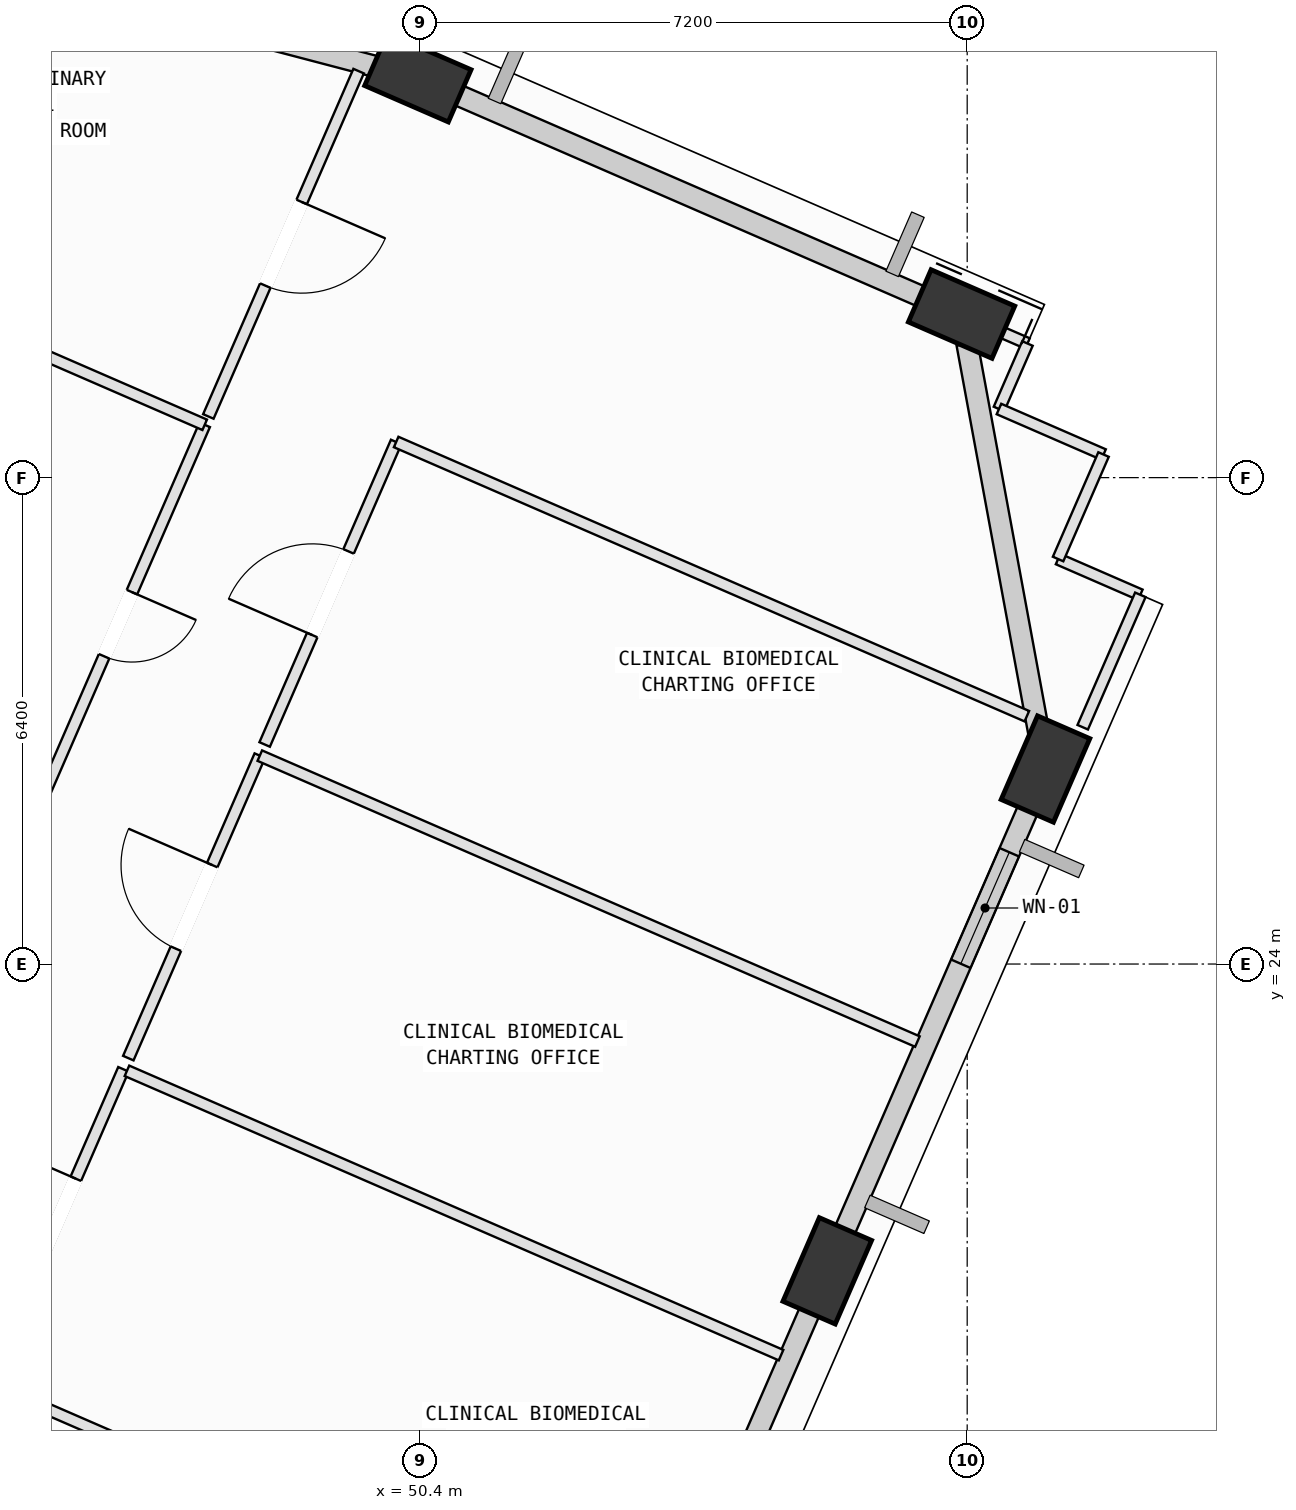
"""IFC4 building model, lengths in metres.
Left out: names, types, materials, properties, quantities, classifications, styles, units other than length and angle.
Written with IfcOpenShell. Run it as: python <this file> out.ifc"""

import sys

from ifc_helpers import new_model, si_unit, direction, frame, frame_2d, origin, origin_2d, place, context, subcontext, project, spatial, rectangle, extrude, element, fill, save


model = new_model("IFC4")
c1 = context("Model", 3, precision=1e-05, world=origin(), true_north=direction((0.0, 1.0)))
c2 = subcontext(c1, "Body", "Model", "MODEL_VIEW")
j1 = project(units=[si_unit("LENGTHUNIT", "METRE"), si_unit("PLANEANGLEUNIT", "RADIAN")], contexts=[c1])
p1 = place(None, origin())
s1 = spatial("IfcSite", under=j1, at=p1, CompositionType="ELEMENT")
p2 = place(p1, origin())
s2 = spatial("IfcBuilding", under=s1, at=p2, CompositionType="ELEMENT")
p3 = place(p2, frame((0.0, 0.0, 320.6)))
s3 = spatial("IfcBuildingStorey", under=s2, at=p3, CompositionType="ELEMENT", Elevation=320.6)
for number, where, z_axis, x_axis in (
    (1, (55.759, 19.963, 0.002), (0.0, 0.0, 1.0), (0.399, 0.917, 0.0)),
    (2, (58.63, 26.566, 0.002), (0.0, 0.0, 1.0), (0.399, 0.917, 0.0)),
    (3, (57.526, 32.553, 0.002), (0.0, 0.0, 1.0), (-0.917, 0.399, 0.0)),
    (4, (50.373, 35.663, 0.002), (0.0, 0.0, 1.0), (-0.917, 0.399, 0.0)),
):
    element("IfcColumn", number, at=place(p3, frame(where, z_axis=z_axis, x_axis=x_axis)), inside=s3, PredefinedType="COLUMN", context=c2, shape_type="SweptSolid", body=[
        extrude(rectangle(XDim=1.2, YDim=0.75, at=origin_2d()), origin(), (0.0, 0.0, 1.0), 3.996),
    ])
p4 = place(p3, frame((55.601, 19.598, 0.0), z_axis=(0.0, 0.0, 1.0), x_axis=(-0.398744230651, -0.917062178112, 0.0)))
e5 = element("IfcWall", 5, at=p4, inside=s3, PredefinedType="SOLIDWALL", context=c2, shape_type="SweptSolid", body=[
    extrude(rectangle(XDim=6.405, YDim=0.28, at=frame_2d((3.203, 0.0))), origin(), (0.0, 0.0, 1.0), 3.245),
])
p5 = place(p4, frame((2.432, 0.0, 0.75)))
e6 = element("IfcOpeningElement", 6, at=p5, cuts=e5, PredefinedType="OPENING", context=c2, shape_type="SweptSolid", body=[
    extrude(rectangle(XDim=1.2, YDim=1.75, at=frame_2d((0.6, 0.875))), frame((0.0, 0.15, 0.0), z_axis=(0.0, -1.0, 0.0), x_axis=(1.0, 0.0, 0.0)), (0.0, 0.0, 1.0), 0.3),
])
p6 = place(p3, frame((58.472, 26.201, 0.0), z_axis=(0.0, 0.0, 1.0), x_axis=(-0.398776286617, -0.917048239316, 0.0)))
e7 = element("IfcWall", 7, at=p6, inside=s3, PredefinedType="SOLIDWALL", context=c2, shape_type="SweptSolid", body=[
    extrude(rectangle(XDim=6.405, YDim=0.28, at=frame_2d((3.203, 0.0))), origin(), (0.0, 0.0, 1.0), 3.245),
])
p7 = place(p6, frame((0.796, 0.0, 0.75)))
e8 = element("IfcOpeningElement", 8, at=p7, cuts=e7, PredefinedType="OPENING", context=c2, shape_type="SweptSolid", body=[
    extrude(rectangle(XDim=1.6, YDim=1.95, at=frame_2d((0.8, 0.975))), frame((0.0, 0.15, 0.0), z_axis=(0.0, -1.0, 0.0), x_axis=(1.0, 0.0, 0.0)), (0.0, 0.0, 1.0), 0.3),
])
p8 = place(p3, frame((57.598, 32.162, 0.0), z_axis=(0.0, 0.0, 1.0), x_axis=(0.181421889976, -0.983405357845, 0.0)))
e9 = element("IfcWall", 9, at=p8, inside=s3, PredefinedType="SOLIDWALL", context=c2, shape_type="SweptSolid", body=[
    extrude(rectangle(XDim=5.293, YDim=0.28, at=frame_2d((2.646, 0.0))), origin(), (0.0, 0.0, 1.0), 3.265),
])
p9 = place(p3, frame((50.737, 35.504, 0.0), z_axis=(0.0, 0.0, 1.0), x_axis=(0.917057311373, -0.398755423359, 0.0)))
e10 = element("IfcWall", 10, at=p9, inside=s3, PredefinedType="SOLIDWALL", context=c2, shape_type="SweptSolid", body=[
    extrude(rectangle(XDim=7.005, YDim=0.28, at=frame_2d((3.502, 0.0))), origin(), (0.0, 0.0, 1.0), 3.265),
])
p10 = place(p3, frame((41.264, 38.054, 0.0), z_axis=(0.0, 0.0, 1.0), x_axis=(0.967228971308, -0.253905724755, 0.0)))
e11 = element("IfcWall", 11, at=p10, inside=s3, PredefinedType="SOLIDWALL", context=c2, shape_type="SweptSolid", body=[
    extrude(rectangle(XDim=9.02, YDim=0.28, at=frame_2d((4.51, 0.0))), origin(), (0.0, 0.0, 1.0), 3.265),
])
p11 = place(p3, frame((44.704, 18.489, 0.0), z_axis=(0.0, 0.0, 1.0), x_axis=(0.917037556052, -0.398800853547, 0.0)))
e12 = element("IfcWall", 12, at=p11, inside=s3, PredefinedType="PARTITIONING", context=c2, shape_type="SweptSolid", body=[
    extrude(rectangle(XDim=9.436, YDim=0.15, at=frame_2d((4.718, 0.0))), origin(), (0.0, 0.0, 1.0), 3.78),
])
p12 = place(p3, frame((44.768, 18.635, 0.0), z_axis=(0.0, 0.0, 1.0), x_axis=(0.398828954963, 0.91702533481, 0.0)))
e13 = element("IfcWall", 13, at=p12, inside=s3, PredefinedType="PARTITIONING", context=c2, shape_type="SweptSolid", body=[
    extrude(rectangle(XDim=4.34, YDim=0.15, at=frame_2d((2.17, 0.0))), origin(), (0.0, 0.0, 1.0), 3.415),
])
p13 = place(p12, frame((1.57, 0.0, 0.0)))
e14 = element("IfcOpeningElement", 14, at=p13, cuts=e13, PredefinedType="OPENING", context=c2, shape_type="SweptSolid", body=[
    extrude(rectangle(XDim=1.2, YDim=2.15, at=frame_2d((0.6, 1.075))), frame((0.0, 0.085, 0.0), z_axis=(0.0, -1.0, 0.0), x_axis=(1.0, 0.0, 0.0)), (0.0, 0.0, 1.0), 0.17),
])
p14 = place(p3, frame((46.545, 22.595, 0.0), z_axis=(0.0, 0.0, 1.0), x_axis=(0.917099421132, -0.39865856539, 0.0)))
e15 = element("IfcWall", 15, at=p14, inside=s3, PredefinedType="PARTITIONING", context=c2, shape_type="SweptSolid", body=[
    extrude(rectangle(XDim=9.384, YDim=0.15, at=frame_2d((4.692, 0.0))), origin(), (0.0, 0.0, 1.0), 3.78),
])
p15 = place(p3, frame((46.563, 22.762, 0.0), z_axis=(0.0, 0.0, 1.0), x_axis=(0.398639711207, 0.917107616722, 0.0)))
e16 = element("IfcWall", 16, at=p15, inside=s3, PredefinedType="PARTITIONING", context=c2, shape_type="SweptSolid", body=[
    extrude(rectangle(XDim=4.34, YDim=0.15, at=frame_2d((2.17, 0.0))), origin(), (0.0, 0.0, 1.0), 3.415),
])
p16 = place(p15, frame((1.57, 0.0, 0.0)))
e17 = element("IfcOpeningElement", 17, at=p16, cuts=e16, PredefinedType="OPENING", context=c2, shape_type="SweptSolid", body=[
    extrude(rectangle(XDim=1.2, YDim=2.15, at=frame_2d((0.6, 1.075))), frame((0.0, 0.085, 0.0), z_axis=(0.0, -1.0, 0.0), x_axis=(1.0, 0.0, 0.0)), (0.0, 0.0, 1.0), 0.17),
])
p17 = place(p3, frame((48.293, 26.742, 0.0), z_axis=(0.0, 0.0, 1.0), x_axis=(0.917063062267, -0.398742197197, 0.0)))
e18 = element("IfcWall", 18, at=p17, inside=s3, PredefinedType="PARTITIONING", context=c2, shape_type="SweptSolid", body=[
    extrude(rectangle(XDim=9.435, YDim=0.15, at=frame_2d((4.717, 0.0))), origin(), (0.0, 0.0, 1.0), 3.78),
])
p18 = place(p3, frame((56.128, 20.236, 0.0), z_axis=(0.0, 0.0, 1.0), x_axis=(-0.398658726612, -0.91709935105, 0.0)))
e19 = element("IfcWall", 19, at=p18, inside=s3, PredefinedType="PARTITIONING", context=c2, shape_type="SweptSolid", body=[
    extrude(rectangle(XDim=0.795, YDim=0.15, at=frame_2d((0.397, 0.0))), origin(), (0.0, 0.0, 1.0), 3.245),
])
p19 = place(p3, frame((48.357, 26.889, 0.0), z_axis=(0.0, 0.0, 1.0), x_axis=(0.398639711207, 0.917107616722, 0.0)))
e20 = element("IfcWall", 20, at=p19, inside=s3, PredefinedType="PARTITIONING", context=c2, shape_type="SweptSolid", body=[
    extrude(rectangle(XDim=4.34, YDim=0.15, at=frame_2d((2.17, 0.0))), origin(), (0.0, 0.0, 1.0), 3.78),
])
p20 = place(p19, frame((1.57, 0.0, 0.0)))
e21 = element("IfcOpeningElement", 21, at=p20, cuts=e20, PredefinedType="OPENING", context=c2, shape_type="SweptSolid", body=[
    extrude(rectangle(XDim=1.2, YDim=2.15, at=frame_2d((0.6, 1.075))), frame((0.0, 0.085, 0.0), z_axis=(0.0, -1.0, 0.0), x_axis=(1.0, 0.0, 0.0)), (0.0, 0.0, 1.0), 0.17),
])
p21 = place(p3, frame((50.087, 30.869, 0.0), z_axis=(0.0, 0.0, 1.0), x_axis=(0.917068340421, -0.398730057805, 0.0)))
e22 = element("IfcWall", 22, at=p21, inside=s3, PredefinedType="PARTITIONING", context=c2, shape_type="SweptSolid", body=[
    extrude(rectangle(XDim=9.049, YDim=0.15, at=frame_2d((4.524, 0.0))), origin(), (0.0, 0.0, 1.0), 3.78),
])
p22 = place(p3, frame((59.056, 26.969, 0.0), z_axis=(0.0, 0.0, 1.0), x_axis=(-0.399259700559, -0.91683787635, 0.0)))
e23 = element("IfcWall", 23, at=p22, inside=s3, PredefinedType="PARTITIONING", context=c2, shape_type="SweptSolid", body=[
    extrude(rectangle(XDim=0.937, YDim=0.15, at=frame_2d((0.468, 0.0))), origin(), (0.0, 0.0, 1.0), 3.265),
])
p23 = place(p3, frame((58.796, 29.329, 0.0), z_axis=(0.0, 0.0, 1.0), x_axis=(0.916839684451, -0.399255548509, 0.0)))
e24 = element("IfcWall", 24, at=p23, inside=s3, PredefinedType="PARTITIONING", context=c2, shape_type="SweptSolid", body=[
    extrude(rectangle(XDim=1.18, YDim=0.15, at=frame_2d((0.59, 0.0))), origin(), (0.0, 0.0, 1.0), 3.78),
])
p24 = place(p3, frame((59.878, 28.858, 0.0), z_axis=(0.0, 0.0, 1.0), x_axis=(-0.39892347819, -0.916984219357, 0.0)))
e25 = element("IfcWall", 25, at=p24, inside=s3, PredefinedType="PARTITIONING", context=c2, shape_type="SweptSolid", body=[
    extrude(rectangle(XDim=1.9, YDim=0.15, at=frame_2d((0.95, 0.0))), origin(), (0.0, 0.0, 1.0), 3.78),
])
p25 = place(p3, frame((57.157, 32.702, 0.0), z_axis=(0.0, 0.0, 1.0), x_axis=(0.917222637379, -0.398374991032, 0.0)))
e26 = element("IfcWall", 26, at=p25, inside=s3, PredefinedType="PARTITIONING", context=c2, shape_type="SweptSolid", body=[
    extrude(rectangle(XDim=1.348, YDim=0.15, at=frame_2d((0.674, 0.0))), origin(), (0.0, 0.0, 1.0), 3.265),
])
p26 = place(p3, frame((58.393, 32.165, 0.0), z_axis=(0.0, 0.0, 1.0), x_axis=(-0.39889703488, -0.916995722762, 0.0)))
e27 = element("IfcWall", 27, at=p26, inside=s3, PredefinedType="PARTITIONING", context=c2, shape_type="SweptSolid", body=[
    extrude(rectangle(XDim=0.94, YDim=0.15, at=frame_2d((0.47, 0.0))), origin(), (0.0, 0.0, 1.0), 3.78),
])
p27 = place(p3, frame((58.018, 31.303, 0.0), z_axis=(0.0, 0.0, 1.0), x_axis=(0.91691738696, -0.399077067107, 0.0)))
e28 = element("IfcWall", 28, at=p27, inside=s3, PredefinedType="PARTITIONING", context=c2, shape_type="SweptSolid", body=[
    extrude(rectangle(XDim=1.501, YDim=0.15, at=frame_2d((0.75, 0.0))), origin(), (0.0, 0.0, 1.0), 3.78),
])
p28 = place(p3, frame((59.394, 30.704, 0.0), z_axis=(0.0, 0.0, 1.0), x_axis=(-0.398904712107, -0.916992383097, 0.0)))
e29 = element("IfcWall", 29, at=p28, inside=s3, PredefinedType="PARTITIONING", context=c2, shape_type="SweptSolid", body=[
    extrude(rectangle(XDim=1.5, YDim=0.15, at=frame_2d((0.75, 0.0))), origin(), (0.0, 0.0, 1.0), 3.78),
])
p29 = place(p3, frame((47.568, 31.095, 0.0), z_axis=(0.0, 0.0, 1.0), x_axis=(-0.398677741034, -0.917091085337, 0.0)))
e30 = element("IfcWall", 30, at=p29, inside=s3, PredefinedType="PARTITIONING", context=c2, shape_type="SweptSolid", body=[
    extrude(rectangle(XDim=5.721, YDim=0.15, at=frame_2d((2.861, 0.0))), origin(), (0.0, 0.0, 1.0), 3.78),
])
p30 = place(p29, frame((2.401, 0.0, 0.0)))
e31 = element("IfcOpeningElement", 31, at=p30, cuts=e30, PredefinedType="OPENING", context=c2, shape_type="SweptSolid", body=[
    extrude(rectangle(XDim=0.92, YDim=2.1, at=frame_2d((0.46, 1.05))), frame((0.0, 0.085, 0.0), z_axis=(0.0, -1.0, 0.0), x_axis=(1.0, 0.0, 0.0)), (0.0, 0.0, 1.0), 0.17),
])
p31 = place(p3, frame((39.466, 34.618, 0.0), z_axis=(0.0, 0.0, 1.0), x_axis=(0.917056875857, -0.398756424957, 0.0)))
e32 = element("IfcWall", 32, at=p31, inside=s3, PredefinedType="PARTITIONING", context=c2, shape_type="SweptSolid", body=[
    extrude(rectangle(XDim=8.835, YDim=0.15, at=frame_2d((4.417, 0.0))), origin(), (0.0, 0.0, 1.0), 3.78),
])
p32 = place(p3, frame((49.593, 35.749, 0.0), z_axis=(0.0, 0.0, 1.0), x_axis=(-0.398967500085, -0.916965066879, 0.0)))
e33 = element("IfcWall", 33, at=p32, inside=s3, PredefinedType="PARTITIONING", context=c2, shape_type="SweptSolid", body=[
    extrude(rectangle(XDim=4.955, YDim=0.15, at=frame_2d((2.478, 0.0))), origin(), (0.0, 0.0, 1.0), 2.765),
])
p33 = place(p32, frame((1.878, 0.0, 0.0)))
e34 = element("IfcOpeningElement", 34, at=p33, cuts=e33, PredefinedType="OPENING", context=c2, shape_type="SweptSolid", body=[
    extrude(rectangle(XDim=1.2, YDim=2.15, at=frame_2d((0.6, 1.075))), frame((0.0, 0.085, 0.0), z_axis=(0.0, -1.0, 0.0), x_axis=(1.0, 0.0, 0.0)), (0.0, 0.0, 1.0), 0.17),
])
p34 = place(p7, origin())
e35 = element("IfcWindow", 35, at=p34, inside=s3, PartitioningType="SINGLE_PANEL", PredefinedType="WINDOW", context=c2, shape_type="SweptSolid", body=[
    extrude(rectangle(XDim=1.6, YDim=1.95, at=frame_2d((0.8, 0.975))), frame((0.0, 0.03, 0.0), z_axis=(0.0, -1.0, 0.0), x_axis=(1.0, 0.0, 0.0)), (0.0, 0.0, 1.0), 0.06),
])
fill(e8, e35)
p35 = place(p13, origin())
e36 = element("IfcDoor", 36, at=p35, inside=s3, OperationType="SINGLE_SWING_RIGHT", PredefinedType="DOOR", context=c2, shape_type="SweptSolid", body=[
    extrude(rectangle(XDim=1.2, YDim=2.15, at=frame_2d((0.6, 1.075))), frame((0.0, 0.025, 0.0), z_axis=(0.0, -1.0, 0.0), x_axis=(1.0, 0.0, 0.0)), (0.0, 0.0, 1.0), 0.05),
])
fill(e14, e36)
p36 = place(p16, origin())
e37 = element("IfcDoor", 37, at=p36, inside=s3, OperationType="SINGLE_SWING_RIGHT", PredefinedType="DOOR", context=c2, shape_type="SweptSolid", body=[
    extrude(rectangle(XDim=1.2, YDim=2.15, at=frame_2d((0.6, 1.075))), frame((0.0, 0.025, 0.0), z_axis=(0.0, -1.0, 0.0), x_axis=(1.0, 0.0, 0.0)), (0.0, 0.0, 1.0), 0.05),
])
fill(e17, e37)
p37 = place(p20, origin())
e38 = element("IfcDoor", 38, at=p37, inside=s3, OperationType="SINGLE_SWING_LEFT", PredefinedType="DOOR", context=c2, shape_type="SweptSolid", body=[
    extrude(rectangle(XDim=1.2, YDim=2.15, at=frame_2d((0.6, 1.075))), frame((0.0, 0.025, 0.0), z_axis=(0.0, -1.0, 0.0), x_axis=(1.0, 0.0, 0.0)), (0.0, 0.0, 1.0), 0.05),
])
fill(e21, e38)
p38 = place(p30, origin())
e39 = element("IfcDoor", 39, at=p38, inside=s3, OperationType="SINGLE_SWING_LEFT", PredefinedType="DOOR", context=c2, shape_type="SweptSolid", body=[
    extrude(rectangle(XDim=0.92, YDim=2.1, at=frame_2d((0.46, 1.05))), frame((0.0, 0.025, 0.0), z_axis=(0.0, -1.0, 0.0), x_axis=(1.0, 0.0, 0.0)), (0.0, 0.0, 1.0), 0.05),
])
fill(e31, e39)
p39 = place(p33, origin())
e40 = element("IfcDoor", 40, at=p39, inside=s3, OperationType="SINGLE_SWING_LEFT", PredefinedType="DOOR", context=c2, shape_type="SweptSolid", body=[
    extrude(rectangle(XDim=1.2, YDim=2.15, at=frame_2d((0.6, 1.075))), frame((0.0, 0.025, 0.0), z_axis=(0.0, -1.0, 0.0), x_axis=(1.0, 0.0, 0.0)), (0.0, 0.0, 1.0), 0.05),
])
fill(e34, e40)
save(model, sys.argv[1])
